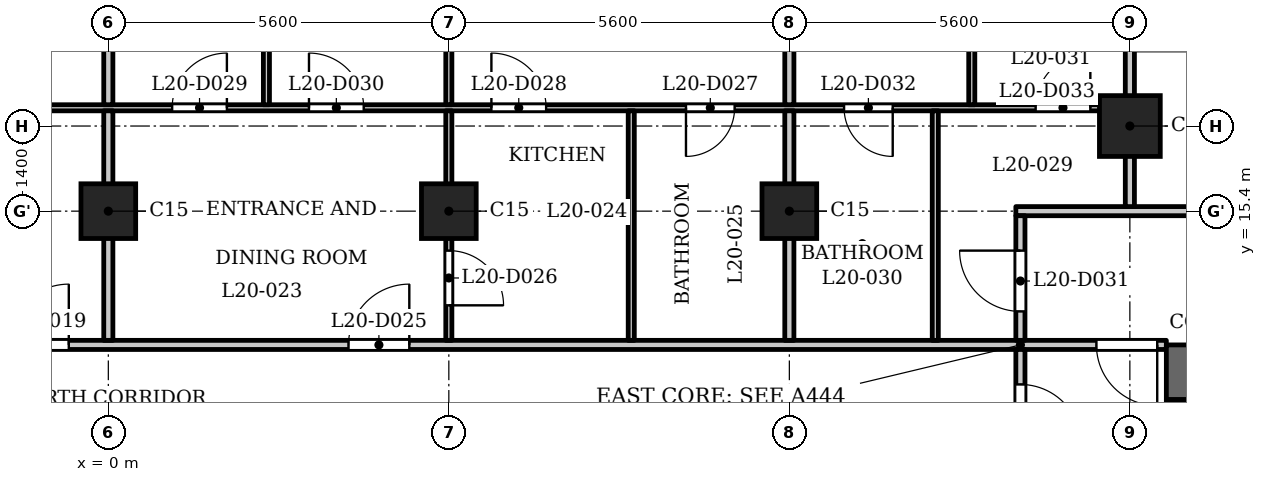
"""IFC4 building model, lengths in metres.
Left out: names, types, materials, properties, quantities, classifications, styles, units other than length and angle.
Written with IfcOpenShell. Run it as: python <this file> out.ifc"""

import sys

from ifc_helpers import new_model, si_unit, direction, frame, frame_2d, origin, origin_2d, place, context, subcontext, project, spatial, rectangle, extrude, element, fill, save


model = new_model("IFC4")
c1 = context("Model", 3, precision=1e-05, world=origin(), true_north=direction((0.0, 1.0)))
c2 = subcontext(c1, "Body", "Model", "MODEL_VIEW")
j1 = project(units=[si_unit("LENGTHUNIT", "METRE"), si_unit("PLANEANGLEUNIT", "RADIAN")], contexts=[c1])
p1 = place(None, origin())
s1 = spatial("IfcSite", under=j1, at=p1, CompositionType="ELEMENT")
p2 = place(p1, origin())
s2 = spatial("IfcBuilding", under=s1, at=p2, CompositionType="ELEMENT")
p3 = place(p2, frame((0.0, 0.0, 83.3)))
s3 = spatial("IfcBuildingStorey", under=s2, at=p3, CompositionType="ELEMENT", Elevation=83.3)
p4 = place(p3, frame((16.8, 16.8, 0.0), z_axis=(0.0, 0.0, 1.0), x_axis=(1.0, 0.0, 0.0)))
e1 = element("IfcColumn", 1, at=p4, inside=s3, PredefinedType="COLUMN", context=c2, shape_type="SweptSolid", body=[
    extrude(rectangle(XDim=1.0, YDim=1.0, at=origin_2d()), origin(), (0.0, 0.0, 1.0), 3.5),
])
for number, where, z_axis, x_axis in (
    (2, (0.0, 15.4, 0.0), (0.0, 0.0, 1.0), (1.0, 0.0, 0.0)),
    (3, (5.6, 15.4, 0.0), (0.0, 0.0, 1.0), (1.0, 0.0, 0.0)),
    (4, (11.2, 15.4, 0.0), (0.0, 0.0, 1.0), (1.0, 0.0, 0.0)),
):
    element("IfcColumn", number, at=place(p3, frame(where, z_axis=z_axis, x_axis=x_axis)), inside=s3, PredefinedType="COLUMN", context=c2, shape_type="SweptSolid", body=[
        extrude(rectangle(XDim=0.9, YDim=0.9, at=origin_2d()), origin(), (0.0, 0.0, 1.0), 3.5),
    ])
p5 = place(p3, frame((17.4, 12.75, 0.0), z_axis=(0.0, 0.0, 1.0), x_axis=(1.0, 0.0, 0.0)))
e5 = element("IfcWall", 5, at=p5, inside=s3, PredefinedType="SHEAR", context=c2, shape_type="SweptSolid", body=[
    extrude(rectangle(XDim=10.4, YDim=0.9, at=frame_2d((5.2, 0.0))), origin(), (0.0, 0.0, 1.0), 3.2),
])
p6 = place(p3, frame((17.6, -12.3, 0.0), z_axis=(0.0, 0.0, 1.0), x_axis=(0.0, 1.0, 0.0)))
e6 = element("IfcWall", 6, at=p6, inside=s3, PredefinedType="SHEAR", context=c2, shape_type="SweptSolid", body=[
    extrude(rectangle(XDim=24.6, YDim=0.4, at=frame_2d((12.3, 0.0))), origin(), (0.0, 0.0, 1.0), 3.2),
])
p7 = place(p6, frame((6.0, 0.0, 0.0)))
e7 = element("IfcOpeningElement", 7, at=p7, cuts=e6, PredefinedType="OPENING", context=c2, shape_type="SweptSolid", body=[
    extrude(rectangle(XDim=1.1, YDim=2.1, at=frame_2d((0.55, 1.05))), frame((0.0, 0.21, 0.0), z_axis=(0.0, -1.0, 0.0), x_axis=(1.0, 0.0, 0.0)), (0.0, 0.0, 1.0), 0.42),
])
p8 = place(p6, frame((8.4, 0.0, 0.0)))
e8 = element("IfcOpeningElement", 8, at=p8, cuts=e6, PredefinedType="OPENING", context=c2, shape_type="SweptSolid", body=[
    extrude(rectangle(XDim=1.1, YDim=2.1, at=frame_2d((0.55, 1.05))), frame((0.0, 0.21, 0.0), z_axis=(0.0, -1.0, 0.0), x_axis=(1.0, 0.0, 0.0)), (0.0, 0.0, 1.0), 0.42),
])
p9 = place(p6, frame((10.8, 0.0, 0.0)))
e9 = element("IfcOpeningElement", 9, at=p9, cuts=e6, PredefinedType="OPENING", context=c2, shape_type="SweptSolid", body=[
    extrude(rectangle(XDim=1.1, YDim=2.1, at=frame_2d((0.55, 1.05))), frame((0.0, 0.21, 0.0), z_axis=(0.0, -1.0, 0.0), x_axis=(1.0, 0.0, 0.0)), (0.0, 0.0, 1.0), 0.42),
])
p10 = place(p6, frame((16.75, 0.0, 0.0)))
e10 = element("IfcOpeningElement", 10, at=p10, cuts=e6, PredefinedType="OPENING", context=c2, shape_type="SweptSolid", body=[
    extrude(rectangle(XDim=0.9, YDim=2.1, at=frame_2d((0.45, 1.05))), frame((0.0, 0.21, 0.0), z_axis=(0.0, -1.0, 0.0), x_axis=(1.0, 0.0, 0.0)), (0.0, 0.0, 1.0), 0.42),
])
p11 = place(p6, frame((22.8, 0.0, 0.0)))
e11 = element("IfcOpeningElement", 11, at=p11, cuts=e6, PredefinedType="OPENING", context=c2, shape_type="SweptSolid", body=[
    extrude(rectangle(XDim=1.1, YDim=2.1, at=frame_2d((0.55, 1.05))), frame((0.0, 0.21, 0.0), z_axis=(0.0, -1.0, 0.0), x_axis=(1.0, 0.0, 0.0)), (0.0, 0.0, 1.0), 0.42),
])
p12 = place(p6, frame((0.7, 0.0, 0.0)))
e12 = element("IfcOpeningElement", 12, at=p12, cuts=e6, PredefinedType="OPENING", context=c2, shape_type="SweptSolid", body=[
    extrude(rectangle(XDim=1.1, YDim=2.1, at=frame_2d((0.55, 1.05))), frame((0.0, 0.21, 0.0), z_axis=(0.0, -1.0, 0.0), x_axis=(1.0, 0.0, 0.0)), (0.0, 0.0, 1.0), 0.42),
])
p13 = place(p6, frame((12.775, 0.0, 0.0)))
e13 = element("IfcOpeningElement", 13, at=p13, cuts=e6, PredefinedType="OPENING", context=c2, shape_type="SweptSolid", body=[
    extrude(rectangle(XDim=1.8, YDim=2.1, at=frame_2d((0.9, 1.05))), frame((0.0, 0.21, 0.0), z_axis=(0.0, -1.0, 0.0), x_axis=(1.0, 0.0, 0.0)), (0.0, 0.0, 1.0), 0.42),
])
p14 = place(p3, frame((-17.4, 13.2, 0.0), z_axis=(0.0, 0.0, 1.0), x_axis=(1.0, 0.0, 0.0)))
e14 = element("IfcWall", 14, at=p14, inside=s3, PredefinedType="PARTITIONING", context=c2, shape_type="SweptSolid", body=[
    extrude(rectangle(XDim=34.8, YDim=0.15, at=frame_2d((17.4, 0.0))), origin(), (0.0, 0.0, 1.0), 3.2),
])
p15 = place(p14, frame((0.25, 0.0, 0.0)))
e15 = element("IfcOpeningElement", 15, at=p15, cuts=e14, PredefinedType="OPENING", context=c2, shape_type="SweptSolid", body=[
    extrude(rectangle(XDim=1.0, YDim=2.1, at=frame_2d((0.5, 1.05))), frame((0.0, 0.085, 0.0), z_axis=(0.0, -1.0, 0.0), x_axis=(1.0, 0.0, 0.0)), (0.0, 0.0, 1.0), 0.17),
])
p16 = place(p14, frame((33.65, 0.0, 0.0)))
e16 = element("IfcOpeningElement", 16, at=p16, cuts=e14, PredefinedType="OPENING", context=c2, shape_type="SweptSolid", body=[
    extrude(rectangle(XDim=1.0, YDim=2.1, at=frame_2d((0.5, 1.05))), frame((0.0, 0.085, 0.0), z_axis=(0.0, -1.0, 0.0), x_axis=(1.0, 0.0, 0.0)), (0.0, 0.0, 1.0), 0.17),
])
p17 = place(p14, frame((15.75, 0.0, 0.0)))
e17 = element("IfcOpeningElement", 17, at=p17, cuts=e14, PredefinedType="OPENING", context=c2, shape_type="SweptSolid", body=[
    extrude(rectangle(XDim=1.0, YDim=2.1, at=frame_2d((0.5, 1.05))), frame((0.0, 0.085, 0.0), z_axis=(0.0, -1.0, 0.0), x_axis=(1.0, 0.0, 0.0)), (0.0, 0.0, 1.0), 0.17),
])
p18 = place(p14, frame((21.35, 0.0, 0.0)))
e18 = element("IfcOpeningElement", 18, at=p18, cuts=e14, PredefinedType="OPENING", context=c2, shape_type="SweptSolid", body=[
    extrude(rectangle(XDim=1.0, YDim=2.1, at=frame_2d((0.5, 1.05))), frame((0.0, 0.085, 0.0), z_axis=(0.0, -1.0, 0.0), x_axis=(1.0, 0.0, 0.0)), (0.0, 0.0, 1.0), 0.17),
])
p19 = place(p3, frame((14.925, 15.4, 0.0), z_axis=(0.0, 0.0, 1.0), x_axis=(1.0, 0.0, 0.0)))
e19 = element("IfcWall", 19, at=p19, inside=s3, PredefinedType="PARTITIONING", context=c2, shape_type="SweptSolid", body=[
    extrude(rectangle(XDim=12.559, YDim=0.15, at=frame_2d((6.279, 0.0))), origin(), (0.0, 0.0, 1.0), 3.2),
])
p20 = place(p19, frame((5.825, 0.0, 0.0)))
e20 = element("IfcOpeningElement", 20, at=p20, cuts=e19, PredefinedType="OPENING", context=c2, shape_type="SweptSolid", body=[
    extrude(rectangle(XDim=1.0, YDim=2.1, at=frame_2d((0.5, 1.05))), frame((0.0, 0.085, 0.0), z_axis=(0.0, -1.0, 0.0), x_axis=(1.0, 0.0, 0.0)), (0.0, 0.0, 1.0), 0.17),
])
p21 = place(p3, frame((-16.725, 17.1, 0.0), z_axis=(0.0, 0.0, 1.0), x_axis=(1.0, 0.0, 0.0)))
e21 = element("IfcWall", 21, at=p21, inside=s3, PredefinedType="PARTITIONING", context=c2, shape_type="SweptSolid", body=[
    extrude(rectangle(XDim=33.45, YDim=0.1, at=frame_2d((16.725, 0.0))), origin(), (0.0, 0.0, 1.0), 3.2),
])
p22 = place(p21, frame((3.925, 0.0, 0.0)))
e22 = element("IfcOpeningElement", 22, at=p22, cuts=e21, PredefinedType="OPENING", context=c2, shape_type="SweptSolid", body=[
    extrude(rectangle(XDim=0.8, YDim=2.1, at=frame_2d((0.4, 1.05))), frame((0.0, 0.06, 0.0), z_axis=(0.0, -1.0, 0.0), x_axis=(1.0, 0.0, 0.0)), (0.0, 0.0, 1.0), 0.12),
])
p23 = place(p21, frame((0.975, 0.0, 0.0)))
e23 = element("IfcOpeningElement", 23, at=p23, cuts=e21, PredefinedType="OPENING", context=c2, shape_type="SweptSolid", body=[
    extrude(rectangle(XDim=0.9, YDim=2.1, at=frame_2d((0.45, 1.05))), frame((0.0, 0.06, 0.0), z_axis=(0.0, -1.0, 0.0), x_axis=(1.0, 0.0, 0.0)), (0.0, 0.0, 1.0), 0.12),
])
p24 = place(p21, frame((6.425, 0.0, 0.0)))
e24 = element("IfcOpeningElement", 24, at=p24, cuts=e21, PredefinedType="OPENING", context=c2, shape_type="SweptSolid", body=[
    extrude(rectangle(XDim=0.8, YDim=2.1, at=frame_2d((0.4, 1.05))), frame((0.0, 0.06, 0.0), z_axis=(0.0, -1.0, 0.0), x_axis=(1.0, 0.0, 0.0)), (0.0, 0.0, 1.0), 0.12),
])
p25 = place(p21, frame((8.825, 0.0, 0.0)))
e25 = element("IfcOpeningElement", 25, at=p25, cuts=e21, PredefinedType="OPENING", context=c2, shape_type="SweptSolid", body=[
    extrude(rectangle(XDim=0.9, YDim=2.1, at=frame_2d((0.45, 1.05))), frame((0.0, 0.06, 0.0), z_axis=(0.0, -1.0, 0.0), x_axis=(1.0, 0.0, 0.0)), (0.0, 0.0, 1.0), 0.12),
])
p26 = place(p21, frame((12.375, 0.0, 0.0)))
e26 = element("IfcOpeningElement", 26, at=p26, cuts=e21, PredefinedType="OPENING", context=c2, shape_type="SweptSolid", body=[
    extrude(rectangle(XDim=0.9, YDim=2.1, at=frame_2d((0.45, 1.05))), frame((0.0, 0.06, 0.0), z_axis=(0.0, -1.0, 0.0), x_axis=(1.0, 0.0, 0.0)), (0.0, 0.0, 1.0), 0.12),
])
p27 = place(p21, frame((14.425, 0.0, 0.0)))
e27 = element("IfcOpeningElement", 27, at=p27, cuts=e21, PredefinedType="OPENING", context=c2, shape_type="SweptSolid", body=[
    extrude(rectangle(XDim=0.9, YDim=2.1, at=frame_2d((0.45, 1.05))), frame((0.0, 0.06, 0.0), z_axis=(0.0, -1.0, 0.0), x_axis=(1.0, 0.0, 0.0)), (0.0, 0.0, 1.0), 0.12),
])
p28 = place(p21, frame((26.225, 0.0, 0.0)))
e28 = element("IfcOpeningElement", 28, at=p28, cuts=e21, PredefinedType="OPENING", context=c2, shape_type="SweptSolid", body=[
    extrude(rectangle(XDim=0.8, YDim=2.1, at=frame_2d((0.4, 1.05))), frame((0.0, 0.06, 0.0), z_axis=(0.0, -1.0, 0.0), x_axis=(1.0, 0.0, 0.0)), (0.0, 0.0, 1.0), 0.12),
])
p29 = place(p21, frame((23.025, 0.0, 0.0)))
e29 = element("IfcOpeningElement", 29, at=p29, cuts=e21, PredefinedType="OPENING", context=c2, shape_type="SweptSolid", body=[
    extrude(rectangle(XDim=0.9, YDim=2.1, at=frame_2d((0.45, 1.05))), frame((0.0, 0.06, 0.0), z_axis=(0.0, -1.0, 0.0), x_axis=(1.0, 0.0, 0.0)), (0.0, 0.0, 1.0), 0.12),
])
p30 = place(p21, frame((17.775, 0.0, 0.0)))
e30 = element("IfcOpeningElement", 30, at=p30, cuts=e21, PredefinedType="OPENING", context=c2, shape_type="SweptSolid", body=[
    extrude(rectangle(XDim=0.9, YDim=2.1, at=frame_2d((0.45, 1.05))), frame((0.0, 0.06, 0.0), z_axis=(0.0, -1.0, 0.0), x_axis=(1.0, 0.0, 0.0)), (0.0, 0.0, 1.0), 0.12),
])
p31 = place(p21, frame((20.025, 0.0, 0.0)))
e31 = element("IfcOpeningElement", 31, at=p31, cuts=e21, PredefinedType="OPENING", context=c2, shape_type="SweptSolid", body=[
    extrude(rectangle(XDim=0.9, YDim=2.1, at=frame_2d((0.45, 1.05))), frame((0.0, 0.06, 0.0), z_axis=(0.0, -1.0, 0.0), x_axis=(1.0, 0.0, 0.0)), (0.0, 0.0, 1.0), 0.12),
])
p32 = place(p21, frame((28.825, 0.0, 0.0)))
e32 = element("IfcOpeningElement", 32, at=p32, cuts=e21, PredefinedType="OPENING", context=c2, shape_type="SweptSolid", body=[
    extrude(rectangle(XDim=0.8, YDim=2.1, at=frame_2d((0.4, 1.05))), frame((0.0, 0.06, 0.0), z_axis=(0.0, -1.0, 0.0), x_axis=(1.0, 0.0, 0.0)), (0.0, 0.0, 1.0), 0.12),
])
p33 = place(p21, frame((31.975, 0.0, 0.0)))
e33 = element("IfcOpeningElement", 33, at=p33, cuts=e21, PredefinedType="OPENING", context=c2, shape_type="SweptSolid", body=[
    extrude(rectangle(XDim=0.9, YDim=2.1, at=frame_2d((0.45, 1.05))), frame((0.0, 0.06, 0.0), z_axis=(0.0, -1.0, 0.0), x_axis=(1.0, 0.0, 0.0)), (0.0, 0.0, 1.0), 0.12),
])
p34 = place(p3, frame((0.0, 13.275, 0.0), z_axis=(0.0, 0.0, 1.0), x_axis=(0.0, 1.0, 0.0)))
e34 = element("IfcWall", 34, at=p34, inside=s3, PredefinedType="PARTITIONING", context=c2, shape_type="SweptSolid", body=[
    extrude(rectangle(XDim=3.775, YDim=0.15, at=frame_2d((1.888, 0.0))), origin(), (0.0, 0.0, 1.0), 3.2),
])
p35 = place(p3, frame((0.0, 17.15, 0.0), z_axis=(0.0, 0.0, 1.0), x_axis=(0.0, 1.0, 0.0)))
e35 = element("IfcWall", 35, at=p35, inside=s3, PredefinedType="PARTITIONING", context=c2, shape_type="SweptSolid", body=[
    extrude(rectangle(XDim=5.88, YDim=0.15, at=frame_2d((2.94, 0.0))), origin(), (0.0, 0.0, 1.0), 3.2),
])
p36 = place(p3, frame((2.6, 17.15, 0.0), z_axis=(0.0, 0.0, 1.0), x_axis=(0.0, 1.0, 0.0)))
e36 = element("IfcWall", 36, at=p36, inside=s3, PredefinedType="PARTITIONING", context=c2, shape_type="SweptSolid", body=[
    extrude(rectangle(XDim=4.93, YDim=0.1, at=frame_2d((2.465, 0.0))), origin(), (0.0, 0.0, 1.0), 3.2),
])
p37 = place(p3, frame((5.6, 13.275, 0.0), z_axis=(0.0, 0.0, 1.0), x_axis=(0.0, 1.0, 0.0)))
e37 = element("IfcWall", 37, at=p37, inside=s3, PredefinedType="PARTITIONING", context=c2, shape_type="SweptSolid", body=[
    extrude(rectangle(XDim=3.775, YDim=0.1, at=frame_2d((1.888, 0.0))), origin(), (0.0, 0.0, 1.0), 3.2),
])
p38 = place(p37, frame((0.576, 0.0, 0.0)))
e38 = element("IfcOpeningElement", 38, at=p38, cuts=e37, PredefinedType="OPENING", context=c2, shape_type="SweptSolid", body=[
    extrude(rectangle(XDim=0.9, YDim=2.1, at=frame_2d((0.45, 1.05))), frame((0.0, 0.06, 0.0), z_axis=(0.0, -1.0, 0.0), x_axis=(1.0, 0.0, 0.0)), (0.0, 0.0, 1.0), 0.12),
])
p39 = place(p3, frame((5.6, 17.15, 0.0), z_axis=(0.0, 0.0, 1.0), x_axis=(0.0, 1.0, 0.0)))
e39 = element("IfcWall", 39, at=p39, inside=s3, PredefinedType="PARTITIONING", context=c2, shape_type="SweptSolid", body=[
    extrude(rectangle(XDim=5.88, YDim=0.1, at=frame_2d((2.94, 0.0))), origin(), (0.0, 0.0, 1.0), 3.2),
])
p40 = place(p3, frame((8.6, 13.275, 0.0), z_axis=(0.0, 0.0, 1.0), x_axis=(0.0, 1.0, 0.0)))
e40 = element("IfcWall", 40, at=p40, inside=s3, PredefinedType="PARTITIONING", context=c2, shape_type="SweptSolid", body=[
    extrude(rectangle(XDim=3.775, YDim=0.1, at=frame_2d((1.888, 0.0))), origin(), (0.0, 0.0, 1.0), 3.2),
])
p41 = place(p3, frame((11.2, 13.275, 0.0), z_axis=(0.0, 0.0, 1.0), x_axis=(0.0, 1.0, 0.0)))
e41 = element("IfcWall", 41, at=p41, inside=s3, PredefinedType="PARTITIONING", context=c2, shape_type="SweptSolid", body=[
    extrude(rectangle(XDim=3.775, YDim=0.15, at=frame_2d((1.888, 0.0))), origin(), (0.0, 0.0, 1.0), 3.2),
])
p42 = place(p3, frame((11.2, 17.15, 0.0), z_axis=(0.0, 0.0, 1.0), x_axis=(0.0, 1.0, 0.0)))
e42 = element("IfcWall", 42, at=p42, inside=s3, PredefinedType="PARTITIONING", context=c2, shape_type="SweptSolid", body=[
    extrude(rectangle(XDim=5.88, YDim=0.15, at=frame_2d((2.94, 0.0))), origin(), (0.0, 0.0, 1.0), 3.2),
])
p43 = place(p3, frame((13.6, 13.275, 0.0), z_axis=(0.0, 0.0, 1.0), x_axis=(0.0, 1.0, 0.0)))
e43 = element("IfcWall", 43, at=p43, inside=s3, PredefinedType="PARTITIONING", context=c2, shape_type="SweptSolid", body=[
    extrude(rectangle(XDim=3.775, YDim=0.1, at=frame_2d((1.888, 0.0))), origin(), (0.0, 0.0, 1.0), 3.2),
])
p44 = place(p3, frame((14.2, 17.15, 0.0), z_axis=(0.0, 0.0, 1.0), x_axis=(0.0, 1.0, 0.0)))
e44 = element("IfcWall", 44, at=p44, inside=s3, PredefinedType="PARTITIONING", context=c2, shape_type="SweptSolid", body=[
    extrude(rectangle(XDim=4.93, YDim=0.1, at=frame_2d((2.465, 0.0))), origin(), (0.0, 0.0, 1.0), 3.2),
])
p45 = place(p44, frame((1.36, 0.0, 0.0)))
e45 = element("IfcOpeningElement", 45, at=p45, cuts=e44, PredefinedType="OPENING", context=c2, shape_type="SweptSolid", body=[
    extrude(rectangle(XDim=0.9, YDim=2.1, at=frame_2d((0.45, 1.05))), frame((0.0, 0.06, 0.0), z_axis=(0.0, -1.0, 0.0), x_axis=(1.0, 0.0, 0.0)), (0.0, 0.0, 1.0), 0.12),
])
p46 = place(p3, frame((15.0, 6.769, 0.0), z_axis=(0.0, 0.0, 1.0), x_axis=(0.0, 1.0, 0.0)))
e46 = element("IfcWall", 46, at=p46, inside=s3, PredefinedType="PARTITIONING", context=c2, shape_type="SweptSolid", body=[
    extrude(rectangle(XDim=6.356, YDim=0.15, at=frame_2d((3.178, 0.0))), origin(), (0.0, 0.0, 1.0), 3.2),
])
p47 = place(p46, frame((4.781, 0.0, 0.0)))
e47 = element("IfcOpeningElement", 47, at=p47, cuts=e46, PredefinedType="OPENING", context=c2, shape_type="SweptSolid", body=[
    extrude(rectangle(XDim=1.0, YDim=2.1, at=frame_2d((0.5, 1.05))), frame((0.0, 0.085, 0.0), z_axis=(0.0, -1.0, 0.0), x_axis=(1.0, 0.0, 0.0)), (0.0, 0.0, 1.0), 0.17),
])
p48 = place(p3, frame((15.0, 13.275, 0.0), z_axis=(0.0, 0.0, 1.0), x_axis=(0.0, 1.0, 0.0)))
e48 = element("IfcWall", 48, at=p48, inside=s3, PredefinedType="PARTITIONING", context=c2, shape_type="SweptSolid", body=[
    extrude(rectangle(XDim=2.05, YDim=0.15, at=frame_2d((1.025, 0.0))), origin(), (0.0, 0.0, 1.0), 3.2),
])
p49 = place(p48, frame((0.476, 0.0, 0.0)))
e49 = element("IfcOpeningElement", 49, at=p49, cuts=e48, PredefinedType="OPENING", context=c2, shape_type="SweptSolid", body=[
    extrude(rectangle(XDim=1.0, YDim=2.1, at=frame_2d((0.5, 1.05))), frame((0.0, 0.085, 0.0), z_axis=(0.0, -1.0, 0.0), x_axis=(1.0, 0.0, 0.0)), (0.0, 0.0, 1.0), 0.17),
])
p50 = place(p3, frame((16.8, 15.475, 0.0), z_axis=(0.0, 0.0, 1.0), x_axis=(0.0, 1.0, 0.0)))
e50 = element("IfcWall", 50, at=p50, inside=s3, PredefinedType="PARTITIONING", context=c2, shape_type="SweptSolid", body=[
    extrude(rectangle(XDim=7.555, YDim=0.15, at=frame_2d((3.777, 0.0))), origin(), (0.0, 0.0, 1.0), 3.2),
])
p51 = place(p47, origin())
e51 = element("IfcDoor", 51, at=p51, inside=s3, OperationType="SINGLE_SWING_LEFT", PredefinedType="DOOR", context=c2, shape_type="SweptSolid", body=[
    extrude(rectangle(XDim=1.0, YDim=2.1, at=frame_2d((0.5, 1.05))), frame((0.0, 0.025, 0.0), z_axis=(0.0, -1.0, 0.0), x_axis=(1.0, 0.0, 0.0)), (0.0, 0.0, 1.0), 0.05),
])
fill(e47, e51)
p52 = place(p16, origin())
e52 = element("IfcDoor", 52, at=p52, inside=s3, OperationType="SINGLE_SWING_RIGHT", PredefinedType="DOOR", context=c2, shape_type="SweptSolid", body=[
    extrude(rectangle(XDim=1.0, YDim=2.1, at=frame_2d((0.5, 1.05))), frame((0.0, 0.025, 0.0), z_axis=(0.0, -1.0, 0.0), x_axis=(1.0, 0.0, 0.0)), (0.0, 0.0, 1.0), 0.05),
])
fill(e16, e52)
p53 = place(p17, origin())
e53 = element("IfcDoor", 53, at=p53, inside=s3, OperationType="SINGLE_SWING_LEFT", PredefinedType="DOOR", context=c2, shape_type="SweptSolid", body=[
    extrude(rectangle(XDim=1.0, YDim=2.1, at=frame_2d((0.5, 1.05))), frame((0.0, 0.025, 0.0), z_axis=(0.0, -1.0, 0.0), x_axis=(1.0, 0.0, 0.0)), (0.0, 0.0, 1.0), 0.05),
])
fill(e17, e53)
p54 = place(p18, origin())
e54 = element("IfcDoor", 54, at=p54, inside=s3, OperationType="SINGLE_SWING_LEFT", PredefinedType="DOOR", context=c2, shape_type="SweptSolid", body=[
    extrude(rectangle(XDim=1.0, YDim=2.1, at=frame_2d((0.5, 1.05))), frame((0.0, 0.025, 0.0), z_axis=(0.0, -1.0, 0.0), x_axis=(1.0, 0.0, 0.0)), (0.0, 0.0, 1.0), 0.05),
])
fill(e18, e54)
p55 = place(p38, origin())
e55 = element("IfcDoor", 55, at=p55, inside=s3, OperationType="SINGLE_SWING_LEFT", PredefinedType="DOOR", context=c2, shape_type="SweptSolid", body=[
    extrude(rectangle(XDim=0.9, YDim=2.1, at=frame_2d((0.45, 1.05))), frame((0.0, 0.025, 0.0), z_axis=(0.0, -1.0, 0.0), x_axis=(1.0, 0.0, 0.0)), (0.0, 0.0, 1.0), 0.05),
])
fill(e38, e55)
p56 = place(p28, origin())
e56 = element("IfcDoor", 56, at=p56, inside=s3, OperationType="SINGLE_SWING_LEFT", PredefinedType="DOOR", context=c2, shape_type="SweptSolid", body=[
    extrude(rectangle(XDim=0.8, YDim=2.1, at=frame_2d((0.4, 1.05))), frame((0.0, 0.025, 0.0), z_axis=(0.0, -1.0, 0.0), x_axis=(1.0, 0.0, 0.0)), (0.0, 0.0, 1.0), 0.05),
])
fill(e28, e56)
p57 = place(p29, origin())
e57 = element("IfcDoor", 57, at=p57, inside=s3, OperationType="SINGLE_SWING_RIGHT", PredefinedType="DOOR", context=c2, shape_type="SweptSolid", body=[
    extrude(rectangle(XDim=0.9, YDim=2.1, at=frame_2d((0.45, 1.05))), frame((0.0, 0.025, 0.0), z_axis=(0.0, -1.0, 0.0), x_axis=(1.0, 0.0, 0.0)), (0.0, 0.0, 1.0), 0.05),
])
fill(e29, e57)
p58 = place(p30, origin())
e58 = element("IfcDoor", 58, at=p58, inside=s3, OperationType="SINGLE_SWING_LEFT", PredefinedType="DOOR", context=c2, shape_type="SweptSolid", body=[
    extrude(rectangle(XDim=0.9, YDim=2.1, at=frame_2d((0.45, 1.05))), frame((0.0, 0.025, 0.0), z_axis=(0.0, -1.0, 0.0), x_axis=(1.0, 0.0, 0.0)), (0.0, 0.0, 1.0), 0.05),
])
fill(e30, e58)
p59 = place(p31, origin())
e59 = element("IfcDoor", 59, at=p59, inside=s3, OperationType="SINGLE_SWING_RIGHT", PredefinedType="DOOR", context=c2, shape_type="SweptSolid", body=[
    extrude(rectangle(XDim=0.9, YDim=2.1, at=frame_2d((0.45, 1.05))), frame((0.0, 0.025, 0.0), z_axis=(0.0, -1.0, 0.0), x_axis=(1.0, 0.0, 0.0)), (0.0, 0.0, 1.0), 0.05),
])
fill(e31, e59)
p60 = place(p49, origin())
e60 = element("IfcDoor", 60, at=p60, inside=s3, OperationType="SINGLE_SWING_LEFT", PredefinedType="DOOR", context=c2, shape_type="SweptSolid", body=[
    extrude(rectangle(XDim=1.0, YDim=2.1, at=frame_2d((0.5, 1.05))), frame((0.0, 0.025, 0.0), z_axis=(0.0, -1.0, 0.0), x_axis=(1.0, 0.0, 0.0)), (0.0, 0.0, 1.0), 0.05),
])
fill(e49, e60)
p61 = place(p32, origin())
e61 = element("IfcDoor", 61, at=p61, inside=s3, OperationType="SINGLE_SWING_RIGHT", PredefinedType="DOOR", context=c2, shape_type="SweptSolid", body=[
    extrude(rectangle(XDim=0.8, YDim=2.1, at=frame_2d((0.4, 1.05))), frame((0.0, 0.025, 0.0), z_axis=(0.0, -1.0, 0.0), x_axis=(1.0, 0.0, 0.0)), (0.0, 0.0, 1.0), 0.05),
])
fill(e32, e61)
p62 = place(p33, origin())
e62 = element("IfcDoor", 62, at=p62, inside=s3, OperationType="SINGLE_SWING_LEFT", PredefinedType="DOOR", context=c2, shape_type="SweptSolid", body=[
    extrude(rectangle(XDim=0.9, YDim=2.1, at=frame_2d((0.45, 1.05))), frame((0.0, 0.025, 0.0), z_axis=(0.0, -1.0, 0.0), x_axis=(1.0, 0.0, 0.0)), (0.0, 0.0, 1.0), 0.05),
])
fill(e33, e62)
save(model, sys.argv[1])
